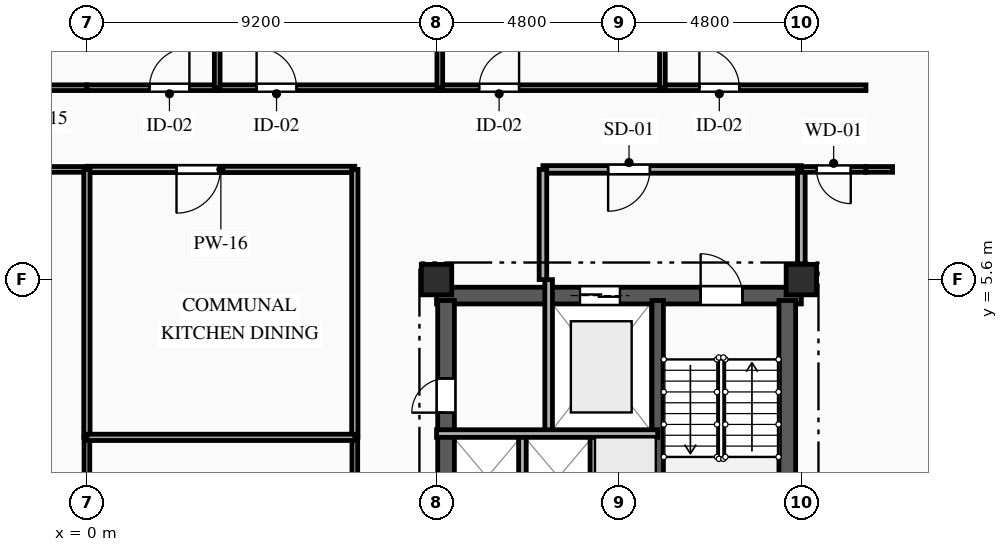
"""IFC4 building model, lengths in metres.
Left out: names, types, materials, properties, quantities, classifications, styles, units other than length and angle.
Written with IfcOpenShell. Run it as: python <this file> out.ifc"""

import sys

from ifc_helpers import new_model, si_unit, direction, frame, frame_2d, origin, origin_2d, place, context, subcontext, project, spatial, rectangle, extrude, element, fill, save


model = new_model("IFC4")
c1 = context("Model", 3, precision=1e-05, world=origin(), true_north=direction((0.0, 1.0)))
c2 = subcontext(c1, "Body", "Model", "MODEL_VIEW")
j1 = project(units=[si_unit("LENGTHUNIT", "METRE"), si_unit("PLANEANGLEUNIT", "RADIAN")], contexts=[c1])
p1 = place(None, origin())
s1 = spatial("IfcSite", under=j1, at=p1, CompositionType="ELEMENT")
p2 = place(p1, origin())
s2 = spatial("IfcBuilding", under=s1, at=p2, CompositionType="ELEMENT")
p3 = place(p2, frame((0.0, 0.0, 248.4)))
s3 = spatial("IfcBuildingStorey", under=s2, at=p3, CompositionType="ELEMENT", Elevation=248.4)
for number, where, z_axis, x_axis in (
    (1, (9.2, 5.6, 0.0), (0.0, 0.0, 1.0), (1.0, 0.0, 0.0)),
    (2, (18.8, 5.6, 0.0), (0.0, 0.0, 1.0), (1.0, 0.0, 0.0)),
):
    element("IfcColumn", number, at=place(p3, frame(where, z_axis=z_axis, x_axis=x_axis)), inside=s3, PredefinedType="COLUMN", context=c2, shape_type="SweptSolid", body=[
        extrude(rectangle(XDim=0.8, YDim=0.8, at=origin_2d()), origin(), (0.0, 0.0, 1.0), 3.35),
    ])
p4 = place(p3, frame((9.2, 5.18, 0.0), z_axis=(0.0, 0.0, 1.0), x_axis=(1.0, 0.0, 0.0)))
e3 = element("IfcWall", 3, at=p4, inside=s3, PredefinedType="SHEAR", context=c2, shape_type="SweptSolid", body=[
    extrude(rectangle(XDim=9.6, YDim=0.44, at=frame_2d((4.8, 0.0))), origin(), (0.0, 0.0, 1.0), 3.04),
])
p5 = place(p4, frame((6.95, 0.0, 0.0)))
e4 = element("IfcOpeningElement", 4, at=p5, cuts=e3, PredefinedType="OPENING", context=c2, shape_type="SweptSolid", body=[
    extrude(rectangle(XDim=1.1, YDim=2.15, at=frame_2d((0.55, 1.075))), frame((0.0, 0.23, 0.0), z_axis=(0.0, -1.0, 0.0), x_axis=(1.0, 0.0, 0.0)), (0.0, 0.0, 1.0), 0.46),
])
p6 = place(p4, frame((3.775, 0.0, 0.0)))
e5 = element("IfcOpeningElement", 5, at=p6, cuts=e3, PredefinedType="OPENING", context=c2, shape_type="SweptSolid", body=[
    extrude(rectangle(XDim=1.05, YDim=2.1, at=frame_2d((0.525, 1.05))), frame((0.0, 0.23, 0.0), z_axis=(0.0, -1.0, 0.0), x_axis=(1.0, 0.0, 0.0)), (0.0, 0.0, 1.0), 0.46),
])
p7 = place(p3, frame((9.45, -5.05, 0.0), z_axis=(0.0, 0.0, 1.0), x_axis=(0.0, 1.0, 0.0)))
e6 = element("IfcWall", 6, at=p7, inside=s3, PredefinedType="SHEAR", context=c2, shape_type="SweptSolid", body=[
    extrude(rectangle(XDim=10.1, YDim=0.44, at=frame_2d((5.05, 0.0))), origin(), (0.0, 0.0, 1.0), 3.04),
])
p8 = place(p7, frame((7.15, 0.0, 0.0)))
e7 = element("IfcOpeningElement", 7, at=p8, cuts=e6, PredefinedType="OPENING", context=c2, shape_type="SweptSolid", body=[
    extrude(rectangle(XDim=0.9, YDim=2.1, at=frame_2d((0.45, 1.05))), frame((0.0, 0.23, 0.0), z_axis=(0.0, -1.0, 0.0), x_axis=(1.0, 0.0, 0.0)), (0.0, 0.0, 1.0), 0.46),
])
p9 = place(p7, frame((2.4, 0.0, 0.0)))
e8 = element("IfcOpeningElement", 8, at=p9, cuts=e6, PredefinedType="OPENING", context=c2, shape_type="SweptSolid", body=[
    extrude(rectangle(XDim=1.2, YDim=2.15, at=frame_2d((0.6, 1.075))), frame((0.0, 0.23, 0.0), z_axis=(0.0, -1.0, 0.0), x_axis=(1.0, 0.0, 0.0)), (0.0, 0.0, 1.0), 0.46),
])
p10 = place(p7, frame((0.35, 0.0, 0.0)))
e9 = element("IfcOpeningElement", 9, at=p10, cuts=e6, PredefinedType="OPENING", context=c2, shape_type="SweptSolid", body=[
    extrude(rectangle(XDim=0.9, YDim=2.1, at=frame_2d((0.45, 1.05))), frame((0.0, 0.23, 0.0), z_axis=(0.0, -1.0, 0.0), x_axis=(1.0, 0.0, 0.0)), (0.0, 0.0, 1.0), 0.46),
])
p11 = place(p3, frame((18.43, -5.05, 0.0), z_axis=(0.0, 0.0, 1.0), x_axis=(0.0, 1.0, 0.0)))
e10 = element("IfcWall", 10, at=p11, inside=s3, PredefinedType="SHEAR", context=c2, shape_type="SweptSolid", body=[
    extrude(rectangle(XDim=10.1, YDim=0.44, at=frame_2d((5.05, 0.0))), origin(), (0.0, 0.0, 1.0), 3.04),
])
p12 = place(p3, frame((15.02, -5.05, 0.0), z_axis=(0.0, 0.0, 1.0), x_axis=(0.0, 1.0, 0.0)))
e11 = element("IfcWall", 11, at=p12, inside=s3, PredefinedType="SHEAR", context=c2, shape_type="SweptSolid", body=[
    extrude(rectangle(XDim=10.1, YDim=0.3, at=frame_2d((5.05, 0.0))), origin(), (0.0, 0.0, 1.0), 3.04),
])
p13 = place(p3, frame((12.15, 5.6, 0.0), z_axis=(0.0, 0.0, 1.0), x_axis=(0.0, -1.0, 0.0)))
e12 = element("IfcWall", 12, at=p13, inside=s3, PredefinedType="PARTITIONING", context=c2, shape_type="SweptSolid", body=[
    extrude(rectangle(XDim=4.05, YDim=0.2, at=frame_2d((2.025, 0.0))), origin(), (0.0, 0.0, 1.0), 3.04),
])
p14 = place(p3, frame((18.8, 8.5, 0.0), z_axis=(0.0, 0.0, 1.0), x_axis=(-1.0, 0.0, 0.0)))
e13 = element("IfcWall", 13, at=p14, inside=s3, PredefinedType="PARTITIONING", context=c2, shape_type="SweptSolid", body=[
    extrude(rectangle(XDim=6.8, YDim=0.2, at=frame_2d((3.4, 0.0))), origin(), (0.0, 0.0, 1.0), 3.04),
])
p15 = place(p14, frame((3.985, 0.0, 0.0)))
e14 = element("IfcOpeningElement", 14, at=p15, cuts=e13, PredefinedType="OPENING", context=c2, shape_type="SweptSolid", body=[
    extrude(rectangle(XDim=1.1, YDim=2.15, at=frame_2d((0.55, 1.075))), frame((0.0, 0.11, 0.0), z_axis=(0.0, -1.0, 0.0), x_axis=(1.0, 0.0, 0.0)), (0.0, 0.0, 1.0), 0.22),
])
p16 = place(p3, frame((12.0, 8.5, 0.0), z_axis=(0.0, 0.0, 1.0), x_axis=(0.0, -1.0, 0.0)))
e15 = element("IfcWall", 15, at=p16, inside=s3, PredefinedType="PARTITIONING", context=c2, shape_type="SweptSolid", body=[
    extrude(rectangle(XDim=2.9, YDim=0.2, at=frame_2d((1.45, 0.0))), origin(), (0.0, 0.0, 1.0), 3.04),
])
p17 = place(p3, frame((18.8, 5.6, 0.0), z_axis=(0.0, 0.0, 1.0), x_axis=(0.0, 1.0, 0.0)))
e16 = element("IfcWall", 16, at=p17, inside=s3, PredefinedType="PARTITIONING", context=c2, shape_type="SweptSolid", body=[
    extrude(rectangle(XDim=2.9, YDim=0.2, at=frame_2d((1.45, 0.0))), origin(), (0.0, 0.0, 1.0), 2.665),
])
for number, where, z_axis, x_axis in (
    (17, (11.46, -0.75, 0.0), (0.0, 0.0, 1.0), (0.0, 1.0, 0.0)),
    (18, (13.34, -0.75, 0.0), (0.0, 0.0, 1.0), (0.0, 1.0, 0.0)),
):
    element("IfcWall", number, at=place(p3, frame(where, z_axis=z_axis, x_axis=x_axis)), inside=s3, PredefinedType="PARTITIONING", context=c2, shape_type="SweptSolid", body=[
        extrude(rectangle(XDim=2.3, YDim=0.2, at=frame_2d((1.15, 0.0))), origin(), (0.0, 0.0, 1.0), 3.04),
    ])
p18 = place(p3, frame((-2.429, 10.65, 0.0), z_axis=(0.0, 0.0, 1.0), x_axis=(1.0, 0.0, 0.0)))
e19 = element("IfcWall", 19, at=p18, inside=s3, PredefinedType="PARTITIONING", context=c2, shape_type="SweptSolid", body=[
    extrude(rectangle(XDim=2.429, YDim=0.15, at=frame_2d((1.214, 0.0))), origin(), (0.0, 0.0, 1.0), 3.04),
])
p19 = place(p3, frame((0.0, 8.5, 0.0), z_axis=(0.0, 0.0, 1.0), x_axis=(-1.0, 0.0, 0.0)))
e20 = element("IfcWall", 20, at=p19, inside=s3, PredefinedType="PARTITIONING", context=c2, shape_type="SweptSolid", body=[
    extrude(rectangle(XDim=7.05, YDim=0.15, at=frame_2d((3.525, 0.0))), origin(), (0.0, 0.0, 1.0), 3.04),
])
p20 = place(p3, frame((20.5, 8.5, 0.0), z_axis=(0.0, 0.0, 1.0), x_axis=(-1.0, 0.0, 0.0)))
e21 = element("IfcWall", 21, at=p20, inside=s3, PredefinedType="PARTITIONING", context=c2, shape_type="SweptSolid", body=[
    extrude(rectangle(XDim=1.7, YDim=0.15, at=frame_2d((0.85, 0.0))), origin(), (0.0, 0.0, 1.0), 3.04),
])
p21 = place(p20, frame((0.4, 0.0, 0.0)))
e22 = element("IfcOpeningElement", 22, at=p21, cuts=e21, PredefinedType="OPENING", context=c2, shape_type="SweptSolid", body=[
    extrude(rectangle(XDim=0.9, YDim=2.1, at=frame_2d((0.45, 1.05))), frame((0.0, 0.085, 0.0), z_axis=(0.0, -1.0, 0.0), x_axis=(1.0, 0.0, 0.0)), (0.0, 0.0, 1.0), 0.17),
])
p22 = place(p3, frame((21.2, 8.5, 0.0), z_axis=(0.0, 0.0, 1.0), x_axis=(-1.0, 0.0, 0.0)))
e23 = element("IfcWall", 23, at=p22, inside=s3, PredefinedType="PARTITIONING", context=c2, shape_type="SweptSolid", body=[
    extrude(rectangle(XDim=0.7, YDim=0.15, at=frame_2d((0.35, 0.0))), origin(), (0.0, 0.0, 1.0), 3.04),
])
p23 = place(p3, frame((0.0, 10.65, 0.0), z_axis=(0.0, 0.0, 1.0), x_axis=(1.0, 0.0, 0.0)))
e24 = element("IfcWall", 24, at=p23, inside=s3, PredefinedType="PARTITIONING", context=c2, shape_type="SweptSolid", body=[
    extrude(rectangle(XDim=3.429, YDim=0.15, at=frame_2d((1.714, 0.0))), origin(), (0.0, 0.0, 1.0), 3.04),
])
p24 = place(p23, frame((1.646, 0.0, 0.0)))
e25 = element("IfcOpeningElement", 25, at=p24, cuts=e24, PredefinedType="OPENING", context=c2, shape_type="SweptSolid", body=[
    extrude(rectangle(XDim=1.05, YDim=2.15, at=frame_2d((0.525, 1.075))), frame((0.0, 0.085, 0.0), z_axis=(0.0, -1.0, 0.0), x_axis=(1.0, 0.0, 0.0)), (0.0, 0.0, 1.0), 0.17),
])
p25 = place(p3, frame((3.429, 10.65, 0.0), z_axis=(0.0, 0.0, 1.0), x_axis=(1.0, 0.0, 0.0)))
e26 = element("IfcWall", 26, at=p25, inside=s3, PredefinedType="PARTITIONING", context=c2, shape_type="SweptSolid", body=[
    extrude(rectangle(XDim=5.857, YDim=0.15, at=frame_2d((2.928, 0.0))), origin(), (0.0, 0.0, 1.0), 3.04),
])
p26 = place(p25, frame((1.036, 0.0, 0.0)))
e27 = element("IfcOpeningElement", 27, at=p26, cuts=e26, PredefinedType="OPENING", context=c2, shape_type="SweptSolid", body=[
    extrude(rectangle(XDim=1.05, YDim=2.15, at=frame_2d((0.525, 1.075))), frame((0.0, 0.085, 0.0), z_axis=(0.0, -1.0, 0.0), x_axis=(1.0, 0.0, 0.0)), (0.0, 0.0, 1.0), 0.17),
])
p27 = place(p3, frame((9.286, 10.65, 0.0), z_axis=(0.0, 0.0, 1.0), x_axis=(1.0, 0.0, 0.0)))
e28 = element("IfcWall", 28, at=p27, inside=s3, PredefinedType="PARTITIONING", context=c2, shape_type="SweptSolid", body=[
    extrude(rectangle(XDim=5.857, YDim=0.15, at=frame_2d((2.929, 0.0))), origin(), (0.0, 0.0, 1.0), 3.04),
])
p28 = place(p27, frame((1.036, 0.0, 0.0)))
e29 = element("IfcOpeningElement", 29, at=p28, cuts=e28, PredefinedType="OPENING", context=c2, shape_type="SweptSolid", body=[
    extrude(rectangle(XDim=1.05, YDim=2.15, at=frame_2d((0.525, 1.075))), frame((0.0, 0.085, 0.0), z_axis=(0.0, -1.0, 0.0), x_axis=(1.0, 0.0, 0.0)), (0.0, 0.0, 1.0), 0.17),
])
p29 = place(p3, frame((15.143, 10.65, 0.0), z_axis=(0.0, 0.0, 1.0), x_axis=(1.0, 0.0, 0.0)))
e30 = element("IfcWall", 30, at=p29, inside=s3, PredefinedType="PARTITIONING", context=c2, shape_type="SweptSolid", body=[
    extrude(rectangle(XDim=5.357, YDim=0.15, at=frame_2d((2.678, 0.0))), origin(), (0.0, 0.0, 1.0), 3.04),
])
p30 = place(p29, frame((0.973, 0.0, 0.0)))
e31 = element("IfcOpeningElement", 31, at=p30, cuts=e30, PredefinedType="OPENING", context=c2, shape_type="SweptSolid", body=[
    extrude(rectangle(XDim=1.05, YDim=2.15, at=frame_2d((0.525, 1.075))), frame((0.0, 0.085, 0.0), z_axis=(0.0, -1.0, 0.0), x_axis=(1.0, 0.0, 0.0)), (0.0, 0.0, 1.0), 0.17),
])
p31 = place(p3, frame((7.05, 8.5, 0.0), z_axis=(0.0, 0.0, 1.0), x_axis=(-1.0, 0.0, 0.0)))
e32 = element("IfcWall", 32, at=p31, inside=s3, PredefinedType="PARTITIONING", context=c2, shape_type="SweptSolid", body=[
    extrude(rectangle(XDim=7.05, YDim=0.165, at=frame_2d((3.525, 0.0))), origin(), (0.0, 0.0, 1.0), 3.04),
])
p32 = place(p31, frame((3.542, 0.0, 0.0)))
e33 = element("IfcOpeningElement", 33, at=p32, cuts=e32, PredefinedType="OPENING", context=c2, shape_type="SweptSolid", body=[
    extrude(rectangle(XDim=1.15, YDim=2.15, at=frame_2d((0.575, 1.075))), frame((0.0, 0.093, 0.0), z_axis=(0.0, -1.0, 0.0), x_axis=(1.0, 0.0, 0.0)), (0.0, 0.0, 1.0), 0.185),
])
p33 = place(p3, frame((7.05, -5.6, 0.0), z_axis=(0.0, 0.0, 1.0), x_axis=(0.0, 1.0, 0.0)))
e34 = element("IfcWall", 34, at=p33, inside=s3, PredefinedType="PARTITIONING", context=c2, shape_type="SweptSolid", body=[
    extrude(rectangle(XDim=7.05, YDim=0.15, at=frame_2d((3.525, 0.0))), origin(), (0.0, 0.0, 1.0), 3.04),
])
p34 = place(p3, frame((7.05, 1.45, 0.0), z_axis=(0.0, 0.0, 1.0), x_axis=(0.0, 1.0, 0.0)))
e35 = element("IfcWall", 35, at=p34, inside=s3, PredefinedType="PARTITIONING", context=c2, shape_type="SweptSolid", body=[
    extrude(rectangle(XDim=7.05, YDim=0.165, at=frame_2d((3.525, 0.0))), origin(), (0.0, 0.0, 1.0), 3.04),
])
for number, where, z_axis, x_axis in (
    (36, (3.429, 15.2, 0.0), (0.0, 0.0, 1.0), (0.0, -1.0, 0.0)),
    (37, (9.286, 15.2, 0.0), (0.0, 0.0, 1.0), (0.0, -1.0, 0.0)),
    (38, (15.143, 15.2, 0.0), (0.0, 0.0, 1.0), (0.0, -1.0, 0.0)),
):
    element("IfcWall", number, at=place(p3, frame(where, z_axis=z_axis, x_axis=x_axis)), inside=s3, PredefinedType="PARTITIONING", context=c2, shape_type="SweptSolid", body=[
        extrude(rectangle(XDim=4.55, YDim=0.15, at=frame_2d((2.275, 0.0))), origin(), (0.0, 0.0, 1.0), 3.04),
    ])
p35 = place(p3, frame((0.0, 1.45, 0.0), z_axis=(0.0, 0.0, 1.0), x_axis=(0.0, -1.0, 0.0)))
e39 = element("IfcWall", 39, at=p35, inside=s3, PredefinedType="PARTITIONING", context=c2, shape_type="SweptSolid", body=[
    extrude(rectangle(XDim=7.05, YDim=0.15, at=frame_2d((3.525, 0.0))), origin(), (0.0, 0.0, 1.0), 3.04),
])
for number, where, z_axis, x_axis in (
    (40, (0.0, 8.5, 0.0), (0.0, 0.0, 1.0), (0.0, -1.0, 0.0)),
    (41, (0.0, 1.45, 0.0), (0.0, 0.0, 1.0), (1.0, 0.0, 0.0)),
):
    element("IfcWall", number, at=place(p3, frame(where, z_axis=z_axis, x_axis=x_axis)), inside=s3, PredefinedType="PARTITIONING", context=c2, shape_type="SweptSolid", body=[
        extrude(rectangle(XDim=7.05, YDim=0.165, at=frame_2d((3.525, 0.0))), origin(), (0.0, 0.0, 1.0), 3.04),
    ])
p36 = place(p3, frame((9.2, 1.55, 0.0), z_axis=(0.0, 0.0, 1.0), x_axis=(1.0, 0.0, 0.0)))
e42 = element("IfcWall", 42, at=p36, inside=s3, PredefinedType="PARTITIONING", context=c2, shape_type="SweptSolid", body=[
    extrude(rectangle(XDim=5.82, YDim=0.2, at=frame_2d((2.91, 0.0))), origin(), (0.0, 0.0, 1.0), 3.04),
])
p37 = place(p5, origin())
e43 = element("IfcDoor", 43, at=p37, inside=s3, OperationType="SINGLE_SWING_LEFT", PredefinedType="DOOR", context=c2, shape_type="SweptSolid", body=[
    extrude(rectangle(XDim=1.1, YDim=2.15, at=frame_2d((0.55, 1.075))), frame((0.0, 0.025, 0.0), z_axis=(0.0, -1.0, 0.0), x_axis=(1.0, 0.0, 0.0)), (0.0, 0.0, 1.0), 0.05),
])
fill(e4, e43)
p38 = place(p6, origin())
e44 = element("IfcDoor", 44, at=p38, inside=s3, OperationType="DOUBLE_DOOR_SLIDING", PredefinedType="DOOR", context=c2, shape_type="SweptSolid", body=[
    extrude(rectangle(XDim=1.05, YDim=2.1, at=frame_2d((0.525, 1.05))), frame((0.0, 0.025, 0.0), z_axis=(0.0, -1.0, 0.0), x_axis=(1.0, 0.0, 0.0)), (0.0, 0.0, 1.0), 0.05),
])
fill(e5, e44)
p39 = place(p15, origin())
e45 = element("IfcDoor", 45, at=p39, inside=s3, OperationType="SINGLE_SWING_RIGHT", PredefinedType="DOOR", context=c2, shape_type="SweptSolid", body=[
    extrude(rectangle(XDim=1.1, YDim=2.15, at=frame_2d((0.55, 1.075))), frame((0.0, 0.025, 0.0), z_axis=(0.0, -1.0, 0.0), x_axis=(1.0, 0.0, 0.0)), (0.0, 0.0, 1.0), 0.05),
])
fill(e14, e45)
p40 = place(p8, origin())
e46 = element("IfcDoor", 46, at=p40, inside=s3, OperationType="SINGLE_SWING_LEFT", PredefinedType="DOOR", context=c2, shape_type="SweptSolid", body=[
    extrude(rectangle(XDim=0.9, YDim=2.1, at=frame_2d((0.45, 1.05))), frame((0.0, 0.025, 0.0), z_axis=(0.0, -1.0, 0.0), x_axis=(1.0, 0.0, 0.0)), (0.0, 0.0, 1.0), 0.05),
])
fill(e7, e46)
p41 = place(p21, origin())
e47 = element("IfcDoor", 47, at=p41, inside=s3, OperationType="SINGLE_SWING_LEFT", PredefinedType="DOOR", context=c2, shape_type="SweptSolid", body=[
    extrude(rectangle(XDim=0.9, YDim=2.1, at=frame_2d((0.45, 1.05))), frame((0.0, 0.025, 0.0), z_axis=(0.0, -1.0, 0.0), x_axis=(1.0, 0.0, 0.0)), (0.0, 0.0, 1.0), 0.05),
])
fill(e22, e47)
p42 = place(p24, origin())
e48 = element("IfcDoor", 48, at=p42, inside=s3, OperationType="SINGLE_SWING_RIGHT", PredefinedType="DOOR", context=c2, shape_type="SweptSolid", body=[
    extrude(rectangle(XDim=1.05, YDim=2.15, at=frame_2d((0.525, 1.075))), frame((0.0, 0.025, 0.0), z_axis=(0.0, -1.0, 0.0), x_axis=(1.0, 0.0, 0.0)), (0.0, 0.0, 1.0), 0.05),
])
fill(e25, e48)
p43 = place(p26, origin())
e49 = element("IfcDoor", 49, at=p43, inside=s3, OperationType="SINGLE_SWING_LEFT", PredefinedType="DOOR", context=c2, shape_type="SweptSolid", body=[
    extrude(rectangle(XDim=1.05, YDim=2.15, at=frame_2d((0.525, 1.075))), frame((0.0, 0.025, 0.0), z_axis=(0.0, -1.0, 0.0), x_axis=(1.0, 0.0, 0.0)), (0.0, 0.0, 1.0), 0.05),
])
fill(e27, e49)
p44 = place(p28, origin())
e50 = element("IfcDoor", 50, at=p44, inside=s3, OperationType="SINGLE_SWING_RIGHT", PredefinedType="DOOR", context=c2, shape_type="SweptSolid", body=[
    extrude(rectangle(XDim=1.05, YDim=2.15, at=frame_2d((0.525, 1.075))), frame((0.0, 0.025, 0.0), z_axis=(0.0, -1.0, 0.0), x_axis=(1.0, 0.0, 0.0)), (0.0, 0.0, 1.0), 0.05),
])
fill(e29, e50)
p45 = place(p30, origin())
e51 = element("IfcDoor", 51, at=p45, inside=s3, OperationType="SINGLE_SWING_LEFT", PredefinedType="DOOR", context=c2, shape_type="SweptSolid", body=[
    extrude(rectangle(XDim=1.05, YDim=2.15, at=frame_2d((0.525, 1.075))), frame((0.0, 0.025, 0.0), z_axis=(0.0, -1.0, 0.0), x_axis=(1.0, 0.0, 0.0)), (0.0, 0.0, 1.0), 0.05),
])
fill(e31, e51)
p46 = place(p32, origin())
e52 = element("IfcDoor", 52, at=p46, inside=s3, OperationType="SINGLE_SWING_RIGHT", PredefinedType="DOOR", context=c2, shape_type="SweptSolid", body=[
    extrude(rectangle(XDim=1.15, YDim=2.15, at=frame_2d((0.575, 1.075))), frame((0.0, 0.025, 0.0), z_axis=(0.0, -1.0, 0.0), x_axis=(1.0, 0.0, 0.0)), (0.0, 0.0, 1.0), 0.05),
])
fill(e33, e52)
save(model, sys.argv[1])
